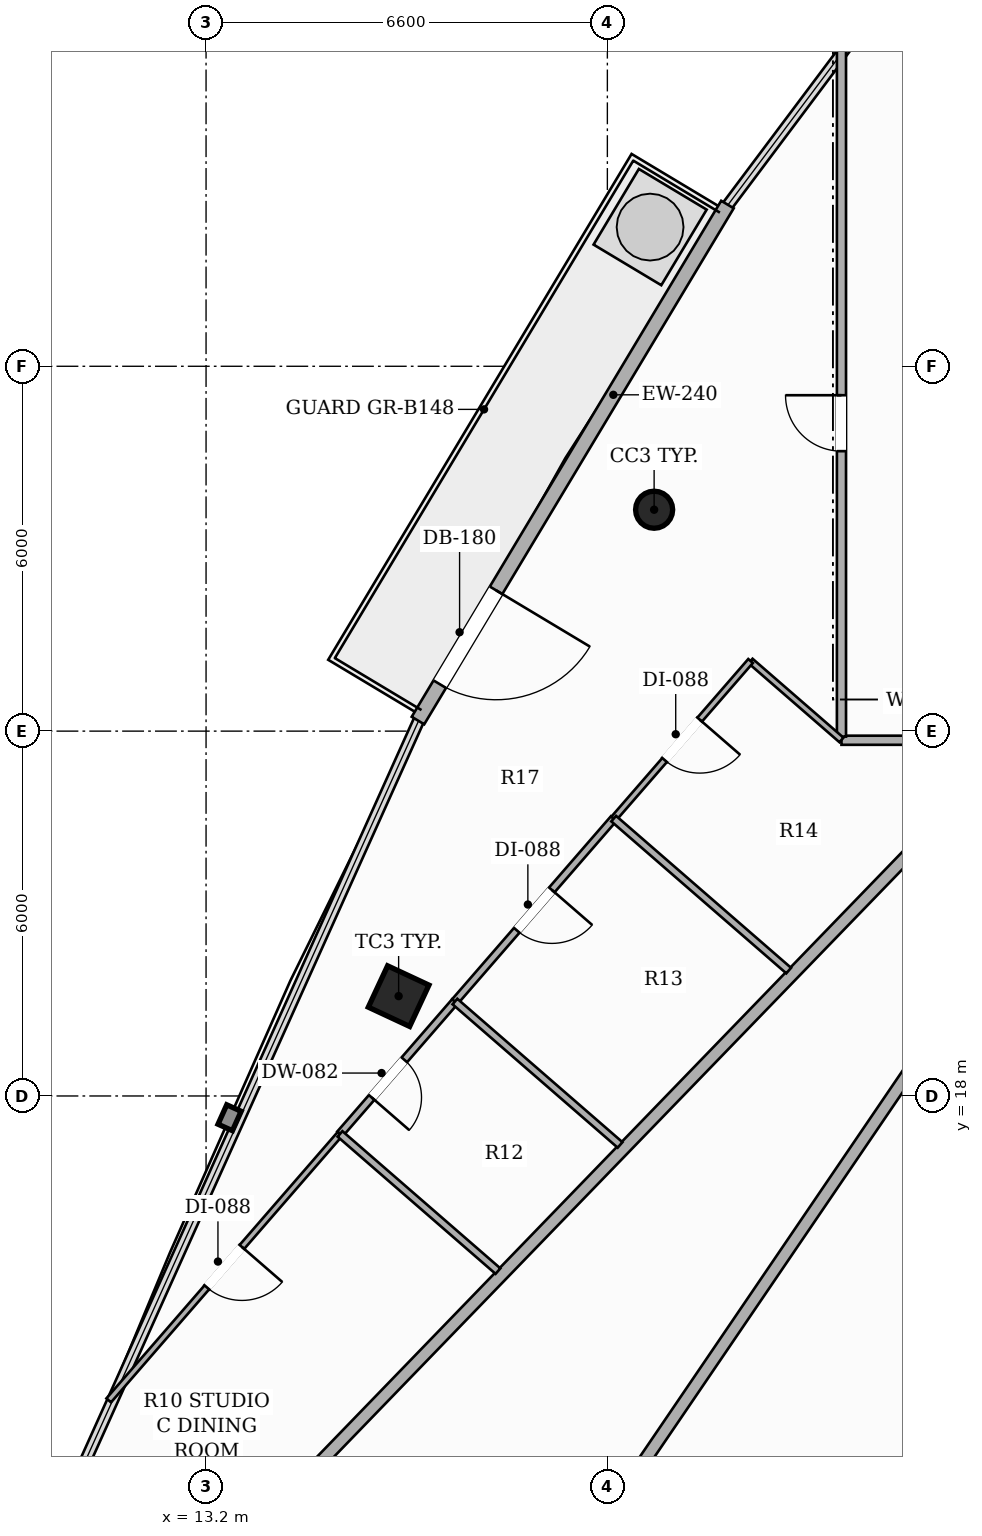
"""IFC4 building model, lengths in metres.
Left out: names, types, materials, properties, quantities, classifications, styles, units other than length and angle.
Written with IfcOpenShell. Run it as: python <this file> out.ifc"""

import sys

from ifc_helpers import new_model, si_unit, direction, frame, frame_2d, origin, origin_2d, place, context, subcontext, project, spatial, rectangle, hollow_rectangle, hollow_circle, extrude, element, fill, save


model = new_model("IFC4")
c1 = context("Model", 3, precision=1e-05, world=origin(), true_north=direction((0.0, 1.0)))
c2 = subcontext(c1, "Body", "Model", "MODEL_VIEW")
j1 = project(units=[si_unit("LENGTHUNIT", "METRE"), si_unit("PLANEANGLEUNIT", "RADIAN")], contexts=[c1])
p1 = place(None, origin())
s1 = spatial("IfcSite", under=j1, at=p1, CompositionType="ELEMENT")
p2 = place(p1, origin())
s2 = spatial("IfcBuilding", under=s1, at=p2, CompositionType="ELEMENT")
p3 = place(p2, frame((0.0, 0.0, 243.65)))
s3 = spatial("IfcBuildingStorey", under=s2, at=p3, CompositionType="ELEMENT", Elevation=243.65)
p4 = place(p3, frame((20.569, 27.641, 0.0), z_axis=(0.0, 0.0, 1.0), x_axis=(1.0, 0.0, 0.0)))
e1 = element("IfcColumn", 1, at=p4, inside=s3, PredefinedType="COLUMN", context=c2, shape_type="SweptSolid", body=[
    extrude(hollow_circle(Radius=0.305, WallThickness=0.016, at=origin_2d()), origin(), (0.0, 0.0, 1.0), 3.3),
])
p5 = place(p3, frame((16.367, 19.642, 0.0), z_axis=(0.0, 0.0, 1.0), x_axis=(0.422618261741, 0.906307787037, 0.0)))
e2 = element("IfcColumn", 2, at=p5, inside=s3, PredefinedType="COLUMN", context=c2, shape_type="SweptSolid", body=[
    extrude(hollow_rectangle(XDim=0.75, YDim=0.75, WallThickness=0.025, at=origin_2d()), origin(), (0.0, 0.0, 1.0), 3.3),
])
p6 = place(p3, frame((21.775, 32.66, 0.0), z_axis=(0.0, 0.0, 1.0), x_axis=(-0.514372387577, -0.857566934354, 0.0)))
e3 = element("IfcWall", 3, at=p6, inside=s3, PredefinedType="SOLIDWALL", context=c2, shape_type="SweptSolid", body=[
    extrude(rectangle(XDim=9.895, YDim=0.24, at=frame_2d((4.948, 0.0))), origin(), (0.0, 0.0, 1.0), 2.624),
])
p7 = place(p6, frame((7.398, 0.0, 0.0)))
e4 = element("IfcOpeningElement", 4, at=p7, cuts=e3, PredefinedType="OPENING", context=c2, shape_type="SweptSolid", body=[
    extrude(rectangle(XDim=1.8, YDim=2.2, at=frame_2d((0.9, 1.1))), frame((0.0, 0.13, 0.0), z_axis=(0.0, -1.0, 0.0), x_axis=(1.0, 0.0, 0.0)), (0.0, 0.0, 1.0), 0.26),
])
p8 = place(p3, frame((32.141, 23.85, 0.0), z_axis=(0.0, 0.0, 1.0), x_axis=(-1.0, 0.0, 0.0)))
e5 = element("IfcWall", 5, at=p8, inside=s3, PredefinedType="PARTITIONING", context=c2, shape_type="SweptSolid", body=[
    extrude(rectangle(XDim=8.491, YDim=0.15, at=frame_2d((4.246, 0.0))), origin(), (0.0, 0.0, 1.0), 2.565),
])
p9 = place(p8, frame((0.848, 0.0, 0.0)))
e6 = element("IfcOpeningElement", 6, at=p9, cuts=e5, PredefinedType="OPENING", context=c2, shape_type="SweptSolid", body=[
    extrude(rectangle(XDim=0.88, YDim=2.1, at=frame_2d((0.44, 1.05))), frame((0.0, 0.085, 0.0), z_axis=(0.0, -1.0, 0.0), x_axis=(1.0, 0.0, 0.0)), (0.0, 0.0, 1.0), 0.17),
])
p10 = place(p8, frame((2.616, 0.0, 0.0)))
e7 = element("IfcOpeningElement", 7, at=p10, cuts=e5, PredefinedType="OPENING", context=c2, shape_type="SweptSolid", body=[
    extrude(rectangle(XDim=0.88, YDim=2.1, at=frame_2d((0.44, 1.05))), frame((0.0, 0.085, 0.0), z_axis=(0.0, -1.0, 0.0), x_axis=(1.0, 0.0, 0.0)), (0.0, 0.0, 1.0), 0.17),
])
p11 = place(p8, frame((4.567, 0.0, 0.0)))
e8 = element("IfcOpeningElement", 8, at=p11, cuts=e5, PredefinedType="OPENING", context=c2, shape_type="SweptSolid", body=[
    extrude(rectangle(XDim=0.88, YDim=2.1, at=frame_2d((0.44, 1.05))), frame((0.0, 0.085, 0.0), z_axis=(0.0, -1.0, 0.0), x_axis=(1.0, 0.0, 0.0)), (0.0, 0.0, 1.0), 0.17),
])
p12 = place(p3, frame((23.65, 23.91, 0.0), z_axis=(0.0, 0.0, 1.0), x_axis=(0.0, 1.0, 0.0)))
e9 = element("IfcWall", 9, at=p12, inside=s3, PredefinedType="PARTITIONING", context=c2, shape_type="SweptSolid", body=[
    extrude(rectangle(XDim=11.337, YDim=0.15, at=frame_2d((5.668, 0.0))), origin(), (0.0, 0.0, 1.0), 2.492),
])
p13 = place(p12, frame((4.694, 0.0, 0.0)))
e10 = element("IfcOpeningElement", 10, at=p13, cuts=e9, PredefinedType="OPENING", context=c2, shape_type="SweptSolid", body=[
    extrude(rectangle(XDim=0.92, YDim=2.15, at=frame_2d((0.46, 1.075))), frame((0.0, 0.085, 0.0), z_axis=(0.0, -1.0, 0.0), x_axis=(1.0, 0.0, 0.0)), (0.0, 0.0, 1.0), 0.17),
])
p14 = place(p3, frame((26.508, 23.79, 0.0), z_axis=(0.0, 0.0, 1.0), x_axis=(-0.695365551949, -0.71865621069, 0.0)))
e11 = element("IfcWall", 11, at=p14, inside=s3, PredefinedType="PARTITIONING", context=c2, shape_type="SweptSolid", body=[
    extrude(rectangle(XDim=21.981, YDim=0.2, at=frame_2d((10.991, 0.0))), origin(), (0.0, 0.0, 1.0), 2.492),
])
p15 = place(p3, frame((22.717, 5.761, 0.0), z_axis=(0.0, 0.0, 1.0), x_axis=(0.383820587854, 0.923407686961, 0.0)))
e12 = element("IfcWall", 12, at=p15, inside=s3, PredefinedType="PARTITIONING", context=c2, shape_type="SweptSolid", body=[
    extrude(rectangle(XDim=19.524, YDim=0.2, at=frame_2d((9.762, 0.0))), origin(), (0.0, 0.0, 1.0), 2.492),
])
p16 = place(p3, frame((16.674, 6.511, 0.0), z_axis=(0.0, 0.0, 1.0), x_axis=(0.562645442508, 0.82669831621, 0.0)))
e13 = element("IfcWall", 13, at=p16, inside=s3, PredefinedType="PARTITIONING", context=c2, shape_type="SweptSolid", body=[
    extrude(rectangle(XDim=20.901, YDim=0.2, at=frame_2d((10.451, 0.0))), origin(), (0.0, 0.0, 1.0), 2.492),
])
p17 = place(p3, frame((17.293, 19.553, 0.0), z_axis=(0.0, 0.0, 1.0), x_axis=(-0.655555788219, -0.755146746357, 0.0)))
e14 = element("IfcWall", 14, at=p17, inside=s3, PredefinedType="PARTITIONING", context=c2, shape_type="SweptSolid", body=[
    extrude(rectangle(XDim=2.883, YDim=0.12, at=frame_2d((1.441, 0.0))), origin(), (0.0, 0.0, 1.0), 2.492),
])
p18 = place(p17, frame((1.269, 0.0, 0.0)))
e15 = element("IfcOpeningElement", 15, at=p18, cuts=e14, PredefinedType="OPENING", context=c2, shape_type="SweptSolid", body=[
    extrude(rectangle(XDim=0.82, YDim=2.1, at=frame_2d((0.41, 1.05))), frame((0.0, 0.07, 0.0), z_axis=(0.0, -1.0, 0.0), x_axis=(1.0, 0.0, 0.0)), (0.0, 0.0, 1.0), 0.14),
])
p19 = place(p3, frame((19.904, 22.561, 0.0), z_axis=(0.0, 0.0, 1.0), x_axis=(-0.655518370372, -0.755179227803, 0.0)))
e16 = element("IfcWall", 16, at=p19, inside=s3, PredefinedType="PARTITIONING", context=c2, shape_type="SweptSolid", body=[
    extrude(rectangle(XDim=3.983, YDim=0.12, at=frame_2d((1.992, 0.0))), origin(), (0.0, 0.0, 1.0), 2.773),
])
p20 = place(p19, frame((1.552, 0.0, 0.0)))
e17 = element("IfcOpeningElement", 17, at=p20, cuts=e16, PredefinedType="OPENING", context=c2, shape_type="SweptSolid", body=[
    extrude(rectangle(XDim=0.88, YDim=2.1, at=frame_2d((0.44, 1.05))), frame((0.0, 0.07, 0.0), z_axis=(0.0, -1.0, 0.0), x_axis=(1.0, 0.0, 0.0)), (0.0, 0.0, 1.0), 0.14),
])
p21 = place(p3, frame((15.403, 17.376, 0.0), z_axis=(0.0, 0.0, 1.0), x_axis=(-0.655535791639, -0.755164105265, 0.0)))
e18 = element("IfcWall", 18, at=p21, inside=s3, PredefinedType="PARTITIONING", context=c2, shape_type="SweptSolid", body=[
    extrude(rectangle(XDim=5.803, YDim=0.1, at=frame_2d((2.901, 0.0))), origin(), (0.0, 0.0, 1.0), 2.492),
])
p22 = place(p21, frame((2.461, 0.0, 0.0)))
e19 = element("IfcOpeningElement", 19, at=p22, cuts=e18, PredefinedType="OPENING", context=c2, shape_type="SweptSolid", body=[
    extrude(rectangle(XDim=0.88, YDim=2.1, at=frame_2d((0.44, 1.05))), frame((0.0, 0.06, 0.0), z_axis=(0.0, -1.0, 0.0), x_axis=(1.0, 0.0, 0.0)), (0.0, 0.0, 1.0), 0.12),
])
p23 = place(p3, frame((23.65, 23.855, 0.0), z_axis=(0.0, 0.0, 1.0), x_axis=(-0.755054003076, 0.655662605643, 0.0)))
e20 = element("IfcWall", 20, at=p23, inside=s3, PredefinedType="PARTITIONING", context=c2, shape_type="SweptSolid", body=[
    extrude(rectangle(XDim=1.98, YDim=0.1, at=frame_2d((0.99, 0.0))), origin(), (0.0, 0.0, 1.0), 2.773),
])
p24 = place(p3, frame((22.155, 25.153, 0.0), z_axis=(0.0, 0.0, 1.0), x_axis=(-0.655685588572, -0.755034044888, 0.0)))
e21 = element("IfcWall", 21, at=p24, inside=s3, PredefinedType="PARTITIONING", context=c2, shape_type="SweptSolid", body=[
    extrude(rectangle(XDim=3.433, YDim=0.1, at=frame_2d((1.717, 0.0))), origin(), (0.0, 0.0, 1.0), 2.773),
])
p25 = place(p24, frame((1.276, 0.0, 0.0)))
e22 = element("IfcOpeningElement", 22, at=p25, cuts=e21, PredefinedType="OPENING", context=c2, shape_type="SweptSolid", body=[
    extrude(rectangle(XDim=0.88, YDim=2.1, at=frame_2d((0.44, 1.05))), frame((0.0, 0.06, 0.0), z_axis=(0.0, -1.0, 0.0), x_axis=(1.0, 0.0, 0.0)), (0.0, 0.0, 1.0), 0.12),
])
p26 = place(p3, frame((17.293, 19.553, 0.0), z_axis=(0.0, 0.0, 1.0), x_axis=(0.755140110276, -0.655563432364, 0.0)))
e23 = element("IfcWall", 23, at=p26, inside=s3, PredefinedType="PARTITIONING", context=c2, shape_type="SweptSolid", body=[
    extrude(rectangle(XDim=3.597, YDim=0.12, at=frame_2d((1.798, 0.0))), origin(), (0.0, 0.0, 1.0), 2.565),
])
p27 = place(p3, frame((18.001, 15.12, 0.0), z_axis=(0.0, 0.0, 1.0), x_axis=(-0.755063624175, 0.655651525925, 0.0)))
e24 = element("IfcWall", 24, at=p27, inside=s3, PredefinedType="PARTITIONING", context=c2, shape_type="SweptSolid", body=[
    extrude(rectangle(XDim=3.441, YDim=0.12, at=frame_2d((1.72, 0.0))), origin(), (0.0, 0.0, 1.0), 2.492),
])
p28 = place(p3, frame((19.904, 22.561, 0.0), z_axis=(0.0, 0.0, 1.0), x_axis=(0.755063159293, -0.655652061293, 0.0)))
e25 = element("IfcWall", 25, at=p28, inside=s3, PredefinedType="PARTITIONING", context=c2, shape_type="SweptSolid", body=[
    extrude(rectangle(XDim=3.812, YDim=0.12, at=frame_2d((1.906, 0.0))), origin(), (0.0, 0.0, 1.0), 2.565),
])
p29 = place(p7, origin())
e26 = element("IfcDoor", 26, at=p29, inside=s3, OperationType="SINGLE_SWING_LEFT", PredefinedType="DOOR", context=c2, shape_type="SweptSolid", body=[
    extrude(rectangle(XDim=1.8, YDim=2.2, at=frame_2d((0.9, 1.1))), frame((0.0, 0.025, 0.0), z_axis=(0.0, -1.0, 0.0), x_axis=(1.0, 0.0, 0.0)), (0.0, 0.0, 1.0), 0.05),
])
fill(e4, e26)
p30 = place(p13, origin())
e27 = element("IfcDoor", 27, at=p30, inside=s3, OperationType="SINGLE_SWING_RIGHT", PredefinedType="DOOR", context=c2, shape_type="SweptSolid", body=[
    extrude(rectangle(XDim=0.92, YDim=2.15, at=frame_2d((0.46, 1.075))), frame((0.0, 0.025, 0.0), z_axis=(0.0, -1.0, 0.0), x_axis=(1.0, 0.0, 0.0)), (0.0, 0.0, 1.0), 0.05),
])
fill(e10, e27)
p31 = place(p18, origin())
e28 = element("IfcDoor", 28, at=p31, inside=s3, OperationType="SINGLE_SWING_RIGHT", PredefinedType="DOOR", context=c2, shape_type="SweptSolid", body=[
    extrude(rectangle(XDim=0.82, YDim=2.1, at=frame_2d((0.41, 1.05))), frame((0.0, 0.025, 0.0), z_axis=(0.0, -1.0, 0.0), x_axis=(1.0, 0.0, 0.0)), (0.0, 0.0, 1.0), 0.05),
])
fill(e15, e28)
p32 = place(p20, origin())
e29 = element("IfcDoor", 29, at=p32, inside=s3, OperationType="SINGLE_SWING_LEFT", PredefinedType="DOOR", context=c2, shape_type="SweptSolid", body=[
    extrude(rectangle(XDim=0.88, YDim=2.1, at=frame_2d((0.44, 1.05))), frame((0.0, 0.025, 0.0), z_axis=(0.0, -1.0, 0.0), x_axis=(1.0, 0.0, 0.0)), (0.0, 0.0, 1.0), 0.05),
])
fill(e17, e29)
p33 = place(p22, origin())
e30 = element("IfcDoor", 30, at=p33, inside=s3, OperationType="SINGLE_SWING_LEFT", PredefinedType="DOOR", context=c2, shape_type="SweptSolid", body=[
    extrude(rectangle(XDim=0.88, YDim=2.1, at=frame_2d((0.44, 1.05))), frame((0.0, 0.025, 0.0), z_axis=(0.0, -1.0, 0.0), x_axis=(1.0, 0.0, 0.0)), (0.0, 0.0, 1.0), 0.05),
])
fill(e19, e30)
p34 = place(p25, origin())
e31 = element("IfcDoor", 31, at=p34, inside=s3, OperationType="SINGLE_SWING_LEFT", PredefinedType="DOOR", context=c2, shape_type="SweptSolid", body=[
    extrude(rectangle(XDim=0.88, YDim=2.1, at=frame_2d((0.44, 1.05))), frame((0.0, 0.025, 0.0), z_axis=(0.0, -1.0, 0.0), x_axis=(1.0, 0.0, 0.0)), (0.0, 0.0, 1.0), 0.05),
])
fill(e22, e31)
save(model, sys.argv[1])
